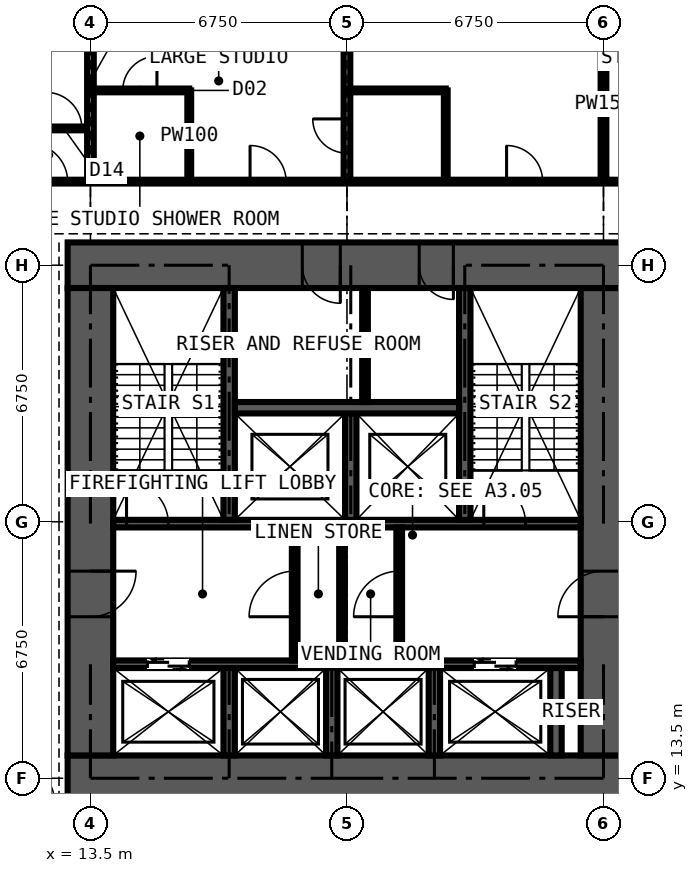
"""IFC4 building model, lengths in metres.
Left out: names, types, materials, properties, quantities, classifications, styles, units other than length and angle.
Written with IfcOpenShell. Run it as: python <this file> out.ifc"""

import sys

from ifc_helpers import new_model, si_unit, direction, frame, frame_2d, origin, place, context, subcontext, project, spatial, rectangle, extrude, element, fill, save


model = new_model("IFC4")
c1 = context("Model", 3, precision=1e-05, world=origin(), true_north=direction((0.0, 1.0)))
c2 = subcontext(c1, "Body", "Model", "MODEL_VIEW")
j1 = project(units=[si_unit("LENGTHUNIT", "METRE"), si_unit("PLANEANGLEUNIT", "RADIAN")], contexts=[c1])
p1 = place(None, origin())
s1 = spatial("IfcSite", under=j1, at=p1, CompositionType="ELEMENT")
p2 = place(p1, origin())
s2 = spatial("IfcBuilding", under=s1, at=p2, CompositionType="ELEMENT")
p3 = place(p2, frame((0.0, 0.0, 98.1)))
s3 = spatial("IfcBuildingStorey", under=s2, at=p3, CompositionType="ELEMENT", Elevation=98.1)
p4 = place(p3, frame((12.9, 13.5, 0.0), z_axis=(0.0, 0.0, 1.0), x_axis=(1.0, 0.0, 0.0)))
e1 = element("IfcWall", 1, at=p4, inside=s3, PredefinedType="SHEAR", context=c2, shape_type="SweptSolid", body=[
    extrude(rectangle(XDim=14.7, YDim=1.2, at=frame_2d((7.35, 0.0))), origin(), (0.0, 0.0, 1.0), 3.6),
])
p5 = place(p3, frame((27.0, 14.1, 0.0), z_axis=(0.0, 0.0, 1.0), x_axis=(0.0, 1.0, 0.0)))
e2 = element("IfcWall", 2, at=p5, inside=s3, PredefinedType="SHEAR", context=c2, shape_type="SweptSolid", body=[
    extrude(rectangle(XDim=12.3, YDim=1.2, at=frame_2d((6.15, 0.0))), origin(), (0.0, 0.0, 1.0), 3.6),
])
p6 = place(p5, frame((3.65, 0.0, 0.0)))
e3 = element("IfcOpeningElement", 3, at=p6, cuts=e2, PredefinedType="OPENING", context=c2, shape_type="SweptSolid", body=[
    extrude(rectangle(XDim=1.2, YDim=2.2, at=frame_2d((0.6, 1.1))), frame((0.0, 0.61, 0.0), z_axis=(0.0, -1.0, 0.0), x_axis=(1.0, 0.0, 0.0)), (0.0, 0.0, 1.0), 1.22),
])
p7 = place(p3, frame((27.6, 27.0, 0.0), z_axis=(0.0, 0.0, 1.0), x_axis=(-1.0, 0.0, 0.0)))
e4 = element("IfcWall", 4, at=p7, inside=s3, PredefinedType="SHEAR", context=c2, shape_type="SweptSolid", body=[
    extrude(rectangle(XDim=14.7, YDim=1.2, at=frame_2d((7.35, 0.0))), origin(), (0.0, 0.0, 1.0), 3.6),
])
p8 = place(p7, frame((4.55, 0.0, 0.0)))
e5 = element("IfcOpeningElement", 5, at=p8, cuts=e4, PredefinedType="OPENING", context=c2, shape_type="SweptSolid", body=[
    extrude(rectangle(XDim=0.9, YDim=2.2, at=frame_2d((0.45, 1.1))), frame((0.0, 0.61, 0.0), z_axis=(0.0, -1.0, 0.0), x_axis=(1.0, 0.0, 0.0)), (0.0, 0.0, 1.0), 1.22),
])
p9 = place(p7, frame((7.525, 0.0, 0.0)))
e6 = element("IfcOpeningElement", 6, at=p9, cuts=e4, PredefinedType="OPENING", context=c2, shape_type="SweptSolid", body=[
    extrude(rectangle(XDim=1.0, YDim=2.2, at=frame_2d((0.5, 1.1))), frame((0.0, 0.61, 0.0), z_axis=(0.0, -1.0, 0.0), x_axis=(1.0, 0.0, 0.0)), (0.0, 0.0, 1.0), 1.22),
])
p10 = place(p3, frame((13.5, 26.4, 0.0), z_axis=(0.0, 0.0, 1.0), x_axis=(0.0, -1.0, 0.0)))
e7 = element("IfcWall", 7, at=p10, inside=s3, PredefinedType="SHEAR", context=c2, shape_type="SweptSolid", body=[
    extrude(rectangle(XDim=12.3, YDim=1.2, at=frame_2d((6.15, 0.0))), origin(), (0.0, 0.0, 1.0), 3.6),
])
p11 = place(p10, frame((7.45, 0.0, 0.0)))
e8 = element("IfcOpeningElement", 8, at=p11, cuts=e7, PredefinedType="OPENING", context=c2, shape_type="SweptSolid", body=[
    extrude(rectangle(XDim=1.2, YDim=2.2, at=frame_2d((0.6, 1.1))), frame((0.0, 0.61, 0.0), z_axis=(0.0, -1.0, 0.0), x_axis=(1.0, 0.0, 0.0)), (0.0, 0.0, 1.0), 1.22),
])
p12 = place(p3, frame((14.1, 16.5, 0.0), z_axis=(0.0, 0.0, 1.0), x_axis=(1.0, 0.0, 0.0)))
e9 = element("IfcWall", 9, at=p12, inside=s3, PredefinedType="SHEAR", context=c2, shape_type="SweptSolid", body=[
    extrude(rectangle(XDim=12.3, YDim=0.2, at=frame_2d((6.15, 0.0))), origin(), (0.0, 0.0, 1.0), 3.6),
])
p13 = place(p12, frame((0.9, 0.0, 0.0)))
e10 = element("IfcOpeningElement", 10, at=p13, cuts=e9, PredefinedType="OPENING", context=c2, shape_type="SweptSolid", body=[
    extrude(rectangle(XDim=1.1, YDim=2.2, at=frame_2d((0.55, 1.1))), frame((0.0, 0.11, 0.0), z_axis=(0.0, -1.0, 0.0), x_axis=(1.0, 0.0, 0.0)), (0.0, 0.0, 1.0), 0.22),
])
p14 = place(p12, frame((9.5, 0.0, 0.0)))
e11 = element("IfcOpeningElement", 11, at=p14, cuts=e9, PredefinedType="OPENING", context=c2, shape_type="SweptSolid", body=[
    extrude(rectangle(XDim=1.1, YDim=2.2, at=frame_2d((0.55, 1.1))), frame((0.0, 0.11, 0.0), z_axis=(0.0, -1.0, 0.0), x_axis=(1.0, 0.0, 0.0)), (0.0, 0.0, 1.0), 0.22),
])
p15 = place(p3, frame((14.1, 20.2, 0.0), z_axis=(0.0, 0.0, 1.0), x_axis=(1.0, 0.0, 0.0)))
e12 = element("IfcWall", 12, at=p15, inside=s3, PredefinedType="SHEAR", context=c2, shape_type="SweptSolid", body=[
    extrude(rectangle(XDim=12.3, YDim=0.2, at=frame_2d((6.15, 0.0))), origin(), (0.0, 0.0, 1.0), 3.6),
])
p16 = place(p15, frame((0.35, 0.0, 0.0)))
e13 = element("IfcOpeningElement", 13, at=p16, cuts=e12, PredefinedType="OPENING", context=c2, shape_type="SweptSolid", body=[
    extrude(rectangle(XDim=1.1, YDim=2.2, at=frame_2d((0.55, 1.1))), frame((0.0, 0.11, 0.0), z_axis=(0.0, -1.0, 0.0), x_axis=(1.0, 0.0, 0.0)), (0.0, 0.0, 1.0), 0.22),
])
p17 = place(p15, frame((9.75, 0.0, 0.0)))
e14 = element("IfcOpeningElement", 14, at=p17, cuts=e12, PredefinedType="OPENING", context=c2, shape_type="SweptSolid", body=[
    extrude(rectangle(XDim=1.1, YDim=2.2, at=frame_2d((0.55, 1.1))), frame((0.0, 0.11, 0.0), z_axis=(0.0, -1.0, 0.0), x_axis=(1.0, 0.0, 0.0)), (0.0, 0.0, 1.0), 0.22),
])
for number, where, z_axis, x_axis in (
    (15, (17.15, 20.3, 0.0), (0.0, 0.0, 1.0), (0.0, 1.0, 0.0)),
    (16, (23.35, 20.3, 0.0), (0.0, 0.0, 1.0), (0.0, 1.0, 0.0)),
):
    element("IfcWall", number, at=place(p3, frame(where, z_axis=z_axis, x_axis=x_axis)), inside=s3, PredefinedType="SHEAR", context=c2, shape_type="SweptSolid", body=[
        extrude(rectangle(XDim=6.1, YDim=0.3, at=frame_2d((3.05, 0.0))), origin(), (0.0, 0.0, 1.0), 3.6),
    ])
p18 = place(p3, frame((20.35, 20.3, 0.0), z_axis=(0.0, 0.0, 1.0), x_axis=(0.0, 1.0, 0.0)))
e17 = element("IfcWall", 17, at=p18, inside=s3, PredefinedType="SHEAR", context=c2, shape_type="SweptSolid", body=[
    extrude(rectangle(XDim=2.8, YDim=0.3, at=frame_2d((1.4, 0.0))), origin(), (0.0, 0.0, 1.0), 3.6),
])
p19 = place(p3, frame((17.3, 23.25, 0.0), z_axis=(0.0, 0.0, 1.0), x_axis=(1.0, 0.0, 0.0)))
e18 = element("IfcWall", 18, at=p19, inside=s3, PredefinedType="SHEAR", context=c2, shape_type="SweptSolid", body=[
    extrude(rectangle(XDim=5.9, YDim=0.3, at=frame_2d((2.95, 0.0))), origin(), (0.0, 0.0, 1.0), 3.6),
])
for number, where, z_axis, x_axis in (
    (19, (17.15, 14.1, 0.0), (0.0, 0.0, 1.0), (0.0, 1.0, 0.0)),
    (20, (19.85, 14.1, 0.0), (0.0, 0.0, 1.0), (0.0, 1.0, 0.0)),
    (21, (22.55, 14.1, 0.0), (0.0, 0.0, 1.0), (0.0, 1.0, 0.0)),
    (22, (25.75, 14.1, 0.0), (0.0, 0.0, 1.0), (0.0, 1.0, 0.0)),
):
    element("IfcWall", number, at=place(p3, frame(where, z_axis=z_axis, x_axis=x_axis)), inside=s3, PredefinedType="SHEAR", context=c2, shape_type="SweptSolid", body=[
        extrude(rectangle(XDim=2.3, YDim=0.3, at=frame_2d((1.15, 0.0))), origin(), (0.0, 0.0, 1.0), 3.6),
    ])
p20 = place(p3, frame((18.875, 16.6, 0.0), z_axis=(0.0, 0.0, 1.0), x_axis=(0.0, 1.0, 0.0)))
e23 = element("IfcWall", 23, at=p20, inside=s3, PredefinedType="PARTITIONING", context=c2, shape_type="SweptSolid", body=[
    extrude(rectangle(XDim=3.5, YDim=0.15, at=frame_2d((1.75, 0.0))), origin(), (0.0, 0.0, 1.0), 3.375),
])
p21 = place(p20, frame((1.15, 0.0, 0.0)))
e24 = element("IfcOpeningElement", 24, at=p21, cuts=e23, PredefinedType="OPENING", context=c2, shape_type="SweptSolid", body=[
    extrude(rectangle(XDim=1.2, YDim=2.2, at=frame_2d((0.6, 1.1))), frame((0.0, 0.085, 0.0), z_axis=(0.0, -1.0, 0.0), x_axis=(1.0, 0.0, 0.0)), (0.0, 0.0, 1.0), 0.17),
])
p22 = place(p3, frame((21.625, 16.6, 0.0), z_axis=(0.0, 0.0, 1.0), x_axis=(0.0, 1.0, 0.0)))
e25 = element("IfcWall", 25, at=p22, inside=s3, PredefinedType="PARTITIONING", context=c2, shape_type="SweptSolid", body=[
    extrude(rectangle(XDim=3.5, YDim=0.15, at=frame_2d((1.75, 0.0))), origin(), (0.0, 0.0, 1.0), 3.375),
])
p23 = place(p22, frame((1.15, 0.0, 0.0)))
e26 = element("IfcOpeningElement", 26, at=p23, cuts=e25, PredefinedType="OPENING", context=c2, shape_type="SweptSolid", body=[
    extrude(rectangle(XDim=1.2, YDim=2.2, at=frame_2d((0.6, 1.1))), frame((0.0, 0.085, 0.0), z_axis=(0.0, -1.0, 0.0), x_axis=(1.0, 0.0, 0.0)), (0.0, 0.0, 1.0), 0.17),
])
p24 = place(p3, frame((20.12, 16.6, 0.0), z_axis=(0.0, 0.0, 1.0), x_axis=(0.0, 1.0, 0.0)))
e27 = element("IfcWall", 27, at=p24, inside=s3, PredefinedType="PARTITIONING", context=c2, shape_type="SweptSolid", body=[
    extrude(rectangle(XDim=3.5, YDim=0.15, at=frame_2d((1.75, 0.0))), origin(), (0.0, 0.0, 1.0), 3.375),
])
p25 = place(p3, frame((20.725, 23.4, 0.0), z_axis=(0.0, 0.0, 1.0), x_axis=(0.0, 1.0, 0.0)))
e28 = element("IfcWall", 28, at=p25, inside=s3, PredefinedType="PARTITIONING", context=c2, shape_type="SweptSolid", body=[
    extrude(rectangle(XDim=3.0, YDim=0.15, at=frame_2d((1.5, 0.0))), origin(), (0.0, 0.0, 1.0), 3.375),
])
p26 = place(p3, frame((10.125, 30.6, 0.0), z_axis=(0.0, 0.0, 1.0), x_axis=(1.0, 0.0, 0.0)))
e29 = element("IfcWall", 29, at=p26, inside=s3, PredefinedType="PARTITIONING", context=c2, shape_type="SweptSolid", body=[
    extrude(rectangle(XDim=3.375, YDim=0.1, at=frame_2d((1.688, 0.0))), origin(), (0.0, 0.0, 1.0), 3.375),
])
p27 = place(p26, frame((2.2, 0.0, 0.0)))
e30 = element("IfcOpeningElement", 30, at=p27, cuts=e29, PredefinedType="OPENING", context=c2, shape_type="SweptSolid", body=[
    extrude(rectangle(XDim=0.95, YDim=2.2, at=frame_2d((0.475, 1.1))), frame((0.0, 0.06, 0.0), z_axis=(0.0, -1.0, 0.0), x_axis=(1.0, 0.0, 0.0)), (0.0, 0.0, 1.0), 0.12),
])
p28 = place(p3, frame((11.3, 29.2, 0.0), z_axis=(0.0, 0.0, 1.0), x_axis=(1.0, 0.0, 0.0)))
e31 = element("IfcWall", 31, at=p28, inside=s3, PredefinedType="PARTITIONING", context=c2, shape_type="SweptSolid", body=[
    extrude(rectangle(XDim=19.075, YDim=0.1, at=frame_2d((9.538, 0.0))), origin(), (0.0, 0.0, 1.0), 3.375),
])
p29 = place(p28, frame((6.4, 0.0, 0.0)))
e32 = element("IfcOpeningElement", 32, at=p29, cuts=e31, PredefinedType="OPENING", context=c2, shape_type="SweptSolid", body=[
    extrude(rectangle(XDim=0.95, YDim=2.2, at=frame_2d((0.475, 1.1))), frame((0.0, 0.06, 0.0), z_axis=(0.0, -1.0, 0.0), x_axis=(1.0, 0.0, 0.0)), (0.0, 0.0, 1.0), 0.12),
])
p30 = place(p28, frame((13.15, 0.0, 0.0)))
e33 = element("IfcOpeningElement", 33, at=p30, cuts=e31, PredefinedType="OPENING", context=c2, shape_type="SweptSolid", body=[
    extrude(rectangle(XDim=0.95, YDim=2.2, at=frame_2d((0.475, 1.1))), frame((0.0, 0.06, 0.0), z_axis=(0.0, -1.0, 0.0), x_axis=(1.0, 0.0, 0.0)), (0.0, 0.0, 1.0), 0.12),
])
p31 = place(p28, frame((0.6, 0.0, 0.0)))
e34 = element("IfcOpeningElement", 34, at=p31, cuts=e31, PredefinedType="OPENING", context=c2, shape_type="SweptSolid", body=[
    extrude(rectangle(XDim=1.0, YDim=2.2, at=frame_2d((0.5, 1.1))), frame((0.0, 0.06, 0.0), z_axis=(0.0, -1.0, 0.0), x_axis=(1.0, 0.0, 0.0)), (0.0, 0.0, 1.0), 0.12),
])
p32 = place(p3, frame((13.5, 29.2, 0.0), z_axis=(0.0, 0.0, 1.0), x_axis=(0.0, 1.0, 0.0)))
e35 = element("IfcWall", 35, at=p32, inside=s3, PredefinedType="PARTITIONING", context=c2, shape_type="SweptSolid", body=[
    extrude(rectangle(XDim=5.284, YDim=0.175, at=frame_2d((2.642, 0.0))), origin(), (0.0, 0.0, 1.0), 2.61),
])
p33 = place(p3, frame((13.5, 31.6, 0.0), z_axis=(0.0, 0.0, 1.0), x_axis=(1.0, 0.0, 0.0)))
e36 = element("IfcWall", 36, at=p33, inside=s3, PredefinedType="PARTITIONING", context=c2, shape_type="SweptSolid", body=[
    extrude(rectangle(XDim=2.6, YDim=0.1, at=frame_2d((1.3, 0.0))), origin(), (0.0, 0.0, 1.0), 3.375),
])
p34 = place(p33, frame((0.85, 0.0, 0.0)))
e37 = element("IfcOpeningElement", 37, at=p34, cuts=e36, PredefinedType="OPENING", context=c2, shape_type="SweptSolid", body=[
    extrude(rectangle(XDim=0.9, YDim=2.2, at=frame_2d((0.45, 1.1))), frame((0.0, 0.06, 0.0), z_axis=(0.0, -1.0, 0.0), x_axis=(1.0, 0.0, 0.0)), (0.0, 0.0, 1.0), 0.12),
])
p35 = place(p3, frame((16.1, 29.2, 0.0), z_axis=(0.0, 0.0, 1.0), x_axis=(0.0, 1.0, 0.0)))
e38 = element("IfcWall", 38, at=p35, inside=s3, PredefinedType="PARTITIONING", context=c2, shape_type="SweptSolid", body=[
    extrude(rectangle(XDim=2.4, YDim=0.1, at=frame_2d((1.2, 0.0))), origin(), (0.0, 0.0, 1.0), 3.375),
])
p36 = place(p3, frame((20.25, 29.2, 0.0), z_axis=(0.0, 0.0, 1.0), x_axis=(0.0, 1.0, 0.0)))
e39 = element("IfcWall", 39, at=p36, inside=s3, PredefinedType="PARTITIONING", context=c2, shape_type="SweptSolid", body=[
    extrude(rectangle(XDim=5.284, YDim=0.175, at=frame_2d((2.642, 0.0))), origin(), (0.0, 0.0, 1.0), 2.61),
])
p37 = place(p36, frame((0.75, 0.0, 0.0)))
e40 = element("IfcOpeningElement", 40, at=p37, cuts=e39, PredefinedType="OPENING", context=c2, shape_type="SweptSolid", body=[
    extrude(rectangle(XDim=0.9, YDim=2.2, at=frame_2d((0.45, 1.1))), frame((0.0, 0.097, 0.0), z_axis=(0.0, -1.0, 0.0), x_axis=(1.0, 0.0, 0.0)), (0.0, 0.0, 1.0), 0.195),
])
p38 = place(p3, frame((20.25, 31.6, 0.0), z_axis=(0.0, 0.0, 1.0), x_axis=(1.0, 0.0, 0.0)))
e41 = element("IfcWall", 41, at=p38, inside=s3, PredefinedType="PARTITIONING", context=c2, shape_type="SweptSolid", body=[
    extrude(rectangle(XDim=2.6, YDim=0.1, at=frame_2d((1.3, 0.0))), origin(), (0.0, 0.0, 1.0), 3.375),
])
p39 = place(p3, frame((22.85, 29.2, 0.0), z_axis=(0.0, 0.0, 1.0), x_axis=(0.0, 1.0, 0.0)))
e42 = element("IfcWall", 42, at=p39, inside=s3, PredefinedType="PARTITIONING", context=c2, shape_type="SweptSolid", body=[
    extrude(rectangle(XDim=2.4, YDim=0.1, at=frame_2d((1.2, 0.0))), origin(), (0.0, 0.0, 1.0), 3.375),
])
p40 = place(p3, frame((27.0, 29.2, 0.0), z_axis=(0.0, 0.0, 1.0), x_axis=(0.0, 1.0, 0.0)))
e43 = element("IfcWall", 43, at=p40, inside=s3, PredefinedType="PARTITIONING", context=c2, shape_type="SweptSolid", body=[
    extrude(rectangle(XDim=5.284, YDim=0.15, at=frame_2d((2.642, 0.0))), origin(), (0.0, 0.0, 1.0), 2.806),
])
p41 = place(p13, origin())
e44 = element("IfcDoor", 44, at=p41, inside=s3, OperationType="DOUBLE_DOOR_SLIDING", PredefinedType="DOOR", context=c2, shape_type="SweptSolid", body=[
    extrude(rectangle(XDim=1.1, YDim=2.2, at=frame_2d((0.55, 1.1))), frame((0.0, 0.025, 0.0), z_axis=(0.0, -1.0, 0.0), x_axis=(1.0, 0.0, 0.0)), (0.0, 0.0, 1.0), 0.05),
])
fill(e10, e44)
p42 = place(p14, origin())
e45 = element("IfcDoor", 45, at=p42, inside=s3, OperationType="DOUBLE_DOOR_SLIDING", PredefinedType="DOOR", context=c2, shape_type="SweptSolid", body=[
    extrude(rectangle(XDim=1.1, YDim=2.2, at=frame_2d((0.55, 1.1))), frame((0.0, 0.025, 0.0), z_axis=(0.0, -1.0, 0.0), x_axis=(1.0, 0.0, 0.0)), (0.0, 0.0, 1.0), 0.05),
])
fill(e11, e45)
p43 = place(p11, origin())
e46 = element("IfcDoor", 46, at=p43, inside=s3, OperationType="DOUBLE_DOOR_SINGLE_SWING", PredefinedType="DOOR", context=c2, shape_type="SweptSolid", body=[
    extrude(rectangle(XDim=1.2, YDim=2.2, at=frame_2d((0.6, 1.1))), frame((0.0, 0.025, 0.0), z_axis=(0.0, -1.0, 0.0), x_axis=(1.0, 0.0, 0.0)), (0.0, 0.0, 1.0), 0.05),
])
fill(e8, e46)
p44 = place(p6, origin())
e47 = element("IfcDoor", 47, at=p44, inside=s3, OperationType="DOUBLE_DOOR_SINGLE_SWING", PredefinedType="DOOR", context=c2, shape_type="SweptSolid", body=[
    extrude(rectangle(XDim=1.2, YDim=2.2, at=frame_2d((0.6, 1.1))), frame((0.0, 0.025, 0.0), z_axis=(0.0, -1.0, 0.0), x_axis=(1.0, 0.0, 0.0)), (0.0, 0.0, 1.0), 0.05),
])
fill(e3, e47)
p45 = place(p21, origin())
e48 = element("IfcDoor", 48, at=p45, inside=s3, OperationType="DOUBLE_DOOR_SINGLE_SWING", PredefinedType="DOOR", context=c2, shape_type="SweptSolid", body=[
    extrude(rectangle(XDim=1.2, YDim=2.2, at=frame_2d((0.6, 1.1))), frame((0.0, 0.025, 0.0), z_axis=(0.0, -1.0, 0.0), x_axis=(1.0, 0.0, 0.0)), (0.0, 0.0, 1.0), 0.05),
])
fill(e24, e48)
p46 = place(p23, origin())
e49 = element("IfcDoor", 49, at=p46, inside=s3, OperationType="DOUBLE_DOOR_SINGLE_SWING", PredefinedType="DOOR", context=c2, shape_type="SweptSolid", body=[
    extrude(rectangle(XDim=1.2, YDim=2.2, at=frame_2d((0.6, 1.1))), frame((0.0, 0.025, 0.0), z_axis=(0.0, -1.0, 0.0), x_axis=(1.0, 0.0, 0.0)), (0.0, 0.0, 1.0), 0.05),
])
fill(e26, e49)
p47 = place(p8, origin())
e50 = element("IfcDoor", 50, at=p47, inside=s3, OperationType="SINGLE_SWING_LEFT", PredefinedType="DOOR", context=c2, shape_type="SweptSolid", body=[
    extrude(rectangle(XDim=0.9, YDim=2.2, at=frame_2d((0.45, 1.1))), frame((0.0, 0.4, 0.0), z_axis=(0.0, -1.0, 0.0), x_axis=(1.0, 0.0, 0.0)), (0.0, 0.0, 1.0), 0.8),
])
fill(e5, e50)
p48 = place(p9, origin())
e51 = element("IfcDoor", 51, at=p48, inside=s3, OperationType="SINGLE_SWING_LEFT", PredefinedType="DOOR", context=c2, shape_type="SweptSolid", body=[
    extrude(rectangle(XDim=1.0, YDim=2.2, at=frame_2d((0.5, 1.1))), frame((0.0, 0.025, 0.0), z_axis=(0.0, -1.0, 0.0), x_axis=(1.0, 0.0, 0.0)), (0.0, 0.0, 1.0), 0.05),
])
fill(e6, e51)
p49 = place(p16, origin())
e52 = element("IfcDoor", 52, at=p49, inside=s3, OperationType="SINGLE_SWING_LEFT", PredefinedType="DOOR", context=c2, shape_type="SweptSolid", body=[
    extrude(rectangle(XDim=1.1, YDim=2.2, at=frame_2d((0.55, 1.1))), frame((0.0, 0.025, 0.0), z_axis=(0.0, -1.0, 0.0), x_axis=(1.0, 0.0, 0.0)), (0.0, 0.0, 1.0), 0.05),
])
fill(e13, e52)
p50 = place(p17, origin())
e53 = element("IfcDoor", 53, at=p50, inside=s3, OperationType="SINGLE_SWING_LEFT", PredefinedType="DOOR", context=c2, shape_type="SweptSolid", body=[
    extrude(rectangle(XDim=1.1, YDim=2.2, at=frame_2d((0.55, 1.1))), frame((0.0, 0.025, 0.0), z_axis=(0.0, -1.0, 0.0), x_axis=(1.0, 0.0, 0.0)), (0.0, 0.0, 1.0), 0.05),
])
fill(e14, e53)
p51 = place(p29, origin())
e54 = element("IfcDoor", 54, at=p51, inside=s3, OperationType="SINGLE_SWING_LEFT", PredefinedType="DOOR", context=c2, shape_type="SweptSolid", body=[
    extrude(rectangle(XDim=0.95, YDim=2.2, at=frame_2d((0.475, 1.1))), frame((0.0, 0.025, 0.0), z_axis=(0.0, -1.0, 0.0), x_axis=(1.0, 0.0, 0.0)), (0.0, 0.0, 1.0), 0.05),
])
fill(e32, e54)
p52 = place(p34, origin())
e55 = element("IfcDoor", 55, at=p52, inside=s3, OperationType="SINGLE_SWING_RIGHT", PredefinedType="DOOR", context=c2, shape_type="SweptSolid", body=[
    extrude(rectangle(XDim=0.9, YDim=2.2, at=frame_2d((0.45, 1.1))), frame((0.0, 0.025, 0.0), z_axis=(0.0, -1.0, 0.0), x_axis=(1.0, 0.0, 0.0)), (0.0, 0.0, 1.0), 0.05),
])
fill(e37, e55)
p53 = place(p30, origin())
e56 = element("IfcDoor", 56, at=p53, inside=s3, OperationType="SINGLE_SWING_LEFT", PredefinedType="DOOR", context=c2, shape_type="SweptSolid", body=[
    extrude(rectangle(XDim=0.95, YDim=2.2, at=frame_2d((0.475, 1.1))), frame((0.0, 0.025, 0.0), z_axis=(0.0, -1.0, 0.0), x_axis=(1.0, 0.0, 0.0)), (0.0, 0.0, 1.0), 0.05),
])
fill(e33, e56)
p54 = place(p37, origin())
e57 = element("IfcDoor", 57, at=p54, inside=s3, OperationType="SINGLE_SWING_RIGHT", PredefinedType="DOOR", context=c2, shape_type="SweptSolid", body=[
    extrude(rectangle(XDim=0.9, YDim=2.2, at=frame_2d((0.45, 1.1))), frame((0.0, 0.025, 0.0), z_axis=(0.0, -1.0, 0.0), x_axis=(1.0, 0.0, 0.0)), (0.0, 0.0, 1.0), 0.05),
])
fill(e40, e57)
p55 = place(p27, origin())
e58 = element("IfcDoor", 58, at=p55, inside=s3, OperationType="SINGLE_SWING_LEFT", PredefinedType="DOOR", context=c2, shape_type="SweptSolid", body=[
    extrude(rectangle(XDim=0.95, YDim=2.2, at=frame_2d((0.475, 1.1))), frame((0.0, 0.025, 0.0), z_axis=(0.0, -1.0, 0.0), x_axis=(1.0, 0.0, 0.0)), (0.0, 0.0, 1.0), 0.05),
])
fill(e30, e58)
p56 = place(p31, origin())
e59 = element("IfcDoor", 59, at=p56, inside=s3, OperationType="SINGLE_SWING_LEFT", PredefinedType="DOOR", context=c2, shape_type="SweptSolid", body=[
    extrude(rectangle(XDim=1.0, YDim=2.2, at=frame_2d((0.5, 1.1))), frame((0.0, 0.025, 0.0), z_axis=(0.0, -1.0, 0.0), x_axis=(1.0, 0.0, 0.0)), (0.0, 0.0, 1.0), 0.05),
])
fill(e34, e59)
save(model, sys.argv[1])
